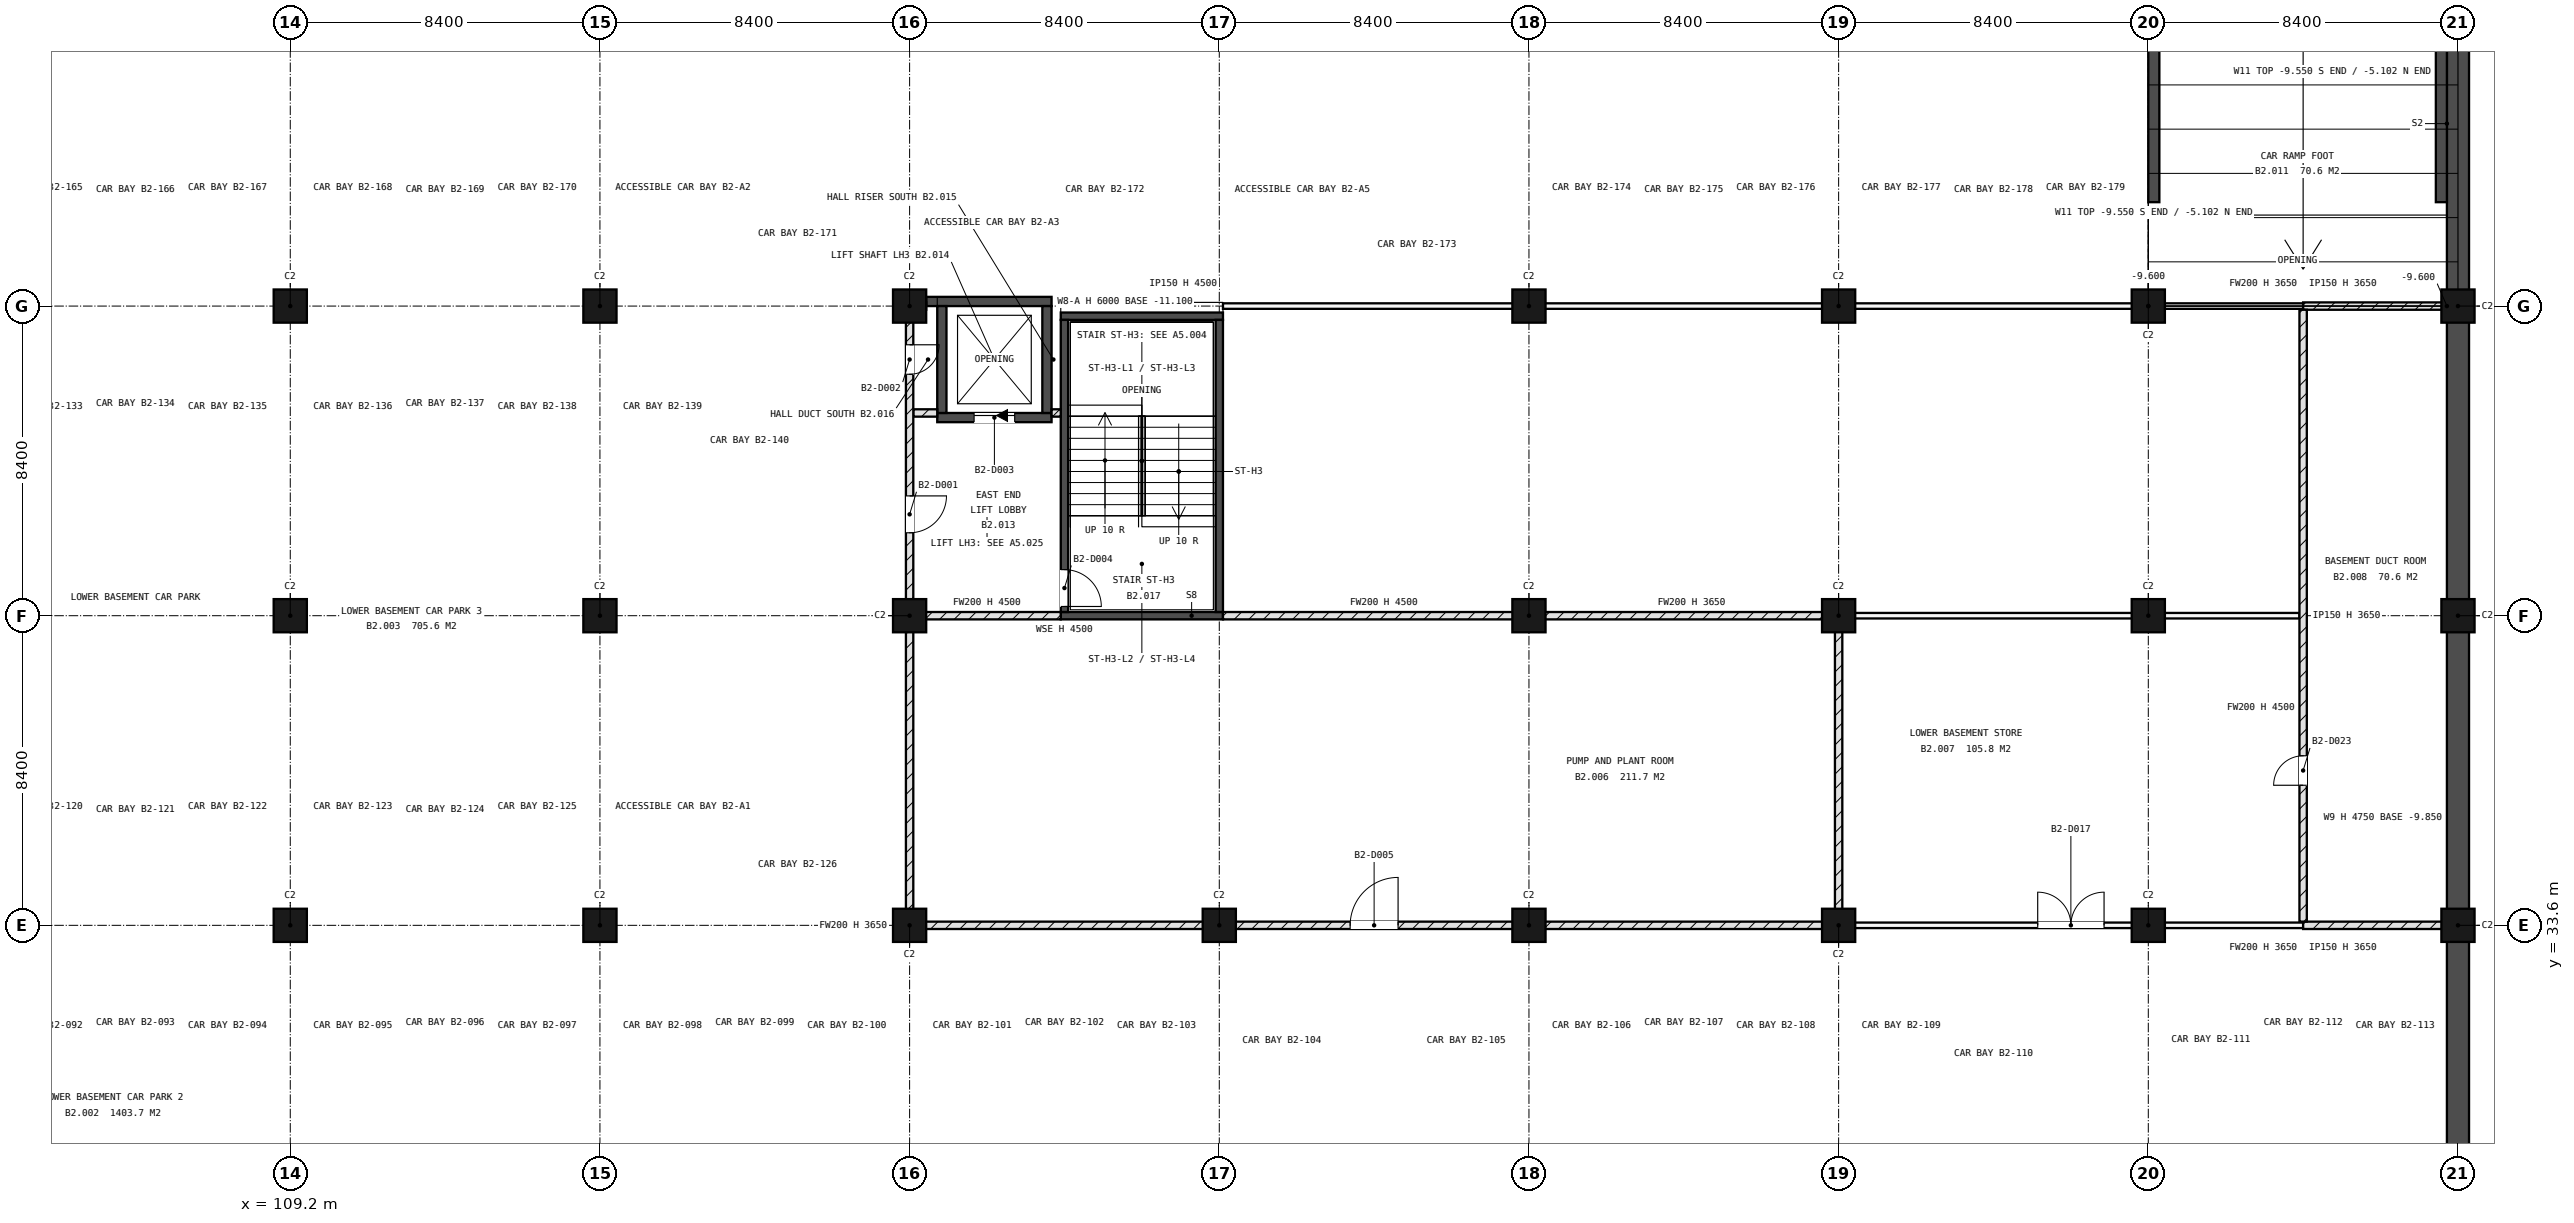
"""IFC4 building model, lengths in metres.
Left out: names, types, materials, properties, quantities, classifications, styles, units other than length and angle.
Written with IfcOpenShell. Run it as: python <this file> out.ifc"""

import sys

from ifc_helpers import new_model, si_unit, direction, frame, frame_2d, origin, origin_2d, place, context, subcontext, project, spatial, polyline, rectangle, outline, extrude, element, fill, save


model = new_model("IFC4")
c1 = context("Model", 3, precision=1e-05, world=origin(), true_north=direction((0.0, 1.0)))
c2 = subcontext(c1, "Body", "Model", "MODEL_VIEW")
j1 = project(units=[si_unit("LENGTHUNIT", "METRE"), si_unit("PLANEANGLEUNIT", "RADIAN")], contexts=[c1])
p1 = place(None, origin())
s1 = spatial("IfcSite", under=j1, at=p1, CompositionType="ELEMENT")
p2 = place(p1, origin())
s2 = spatial("IfcBuilding", under=s1, at=p2, CompositionType="ELEMENT")
p3 = place(p2, frame((0.0, 0.0, -9.6)))
s3 = spatial("IfcBuildingStorey", under=s2, at=p3, CompositionType="ELEMENT", Elevation=-9.6)
for number, where, z_axis, x_axis in (
    (1, (109.2, 33.6, -0.25), (0.0, 0.0, 1.0), (1.0, 0.0, 0.0)),
    (2, (109.2, 42.0, -0.25), (0.0, 0.0, 1.0), (1.0, 0.0, 0.0)),
    (3, (109.2, 50.4, -0.25), (0.0, 0.0, 1.0), (1.0, 0.0, 0.0)),
    (4, (117.6, 33.6, -0.25), (0.0, 0.0, 1.0), (1.0, 0.0, 0.0)),
    (5, (117.6, 42.0, -0.25), (0.0, 0.0, 1.0), (1.0, 0.0, 0.0)),
    (6, (117.6, 50.4, -0.25), (0.0, 0.0, 1.0), (1.0, 0.0, 0.0)),
    (7, (126.0, 33.6, -0.25), (0.0, 0.0, 1.0), (1.0, 0.0, 0.0)),
    (8, (126.0, 42.0, -0.25), (0.0, 0.0, 1.0), (1.0, 0.0, 0.0)),
    (9, (126.0, 50.4, -0.25), (0.0, 0.0, 1.0), (1.0, 0.0, 0.0)),
    (10, (134.4, 33.6, -0.25), (0.0, 0.0, 1.0), (1.0, 0.0, 0.0)),
    (11, (142.8, 33.6, -0.25), (0.0, 0.0, 1.0), (1.0, 0.0, 0.0)),
    (12, (142.8, 42.0, -0.25), (0.0, 0.0, 1.0), (1.0, 0.0, 0.0)),
    (13, (142.8, 50.4, -0.25), (0.0, 0.0, 1.0), (1.0, 0.0, 0.0)),
    (14, (151.2, 33.6, -0.25), (0.0, 0.0, 1.0), (1.0, 0.0, 0.0)),
    (15, (151.2, 42.0, -0.25), (0.0, 0.0, 1.0), (1.0, 0.0, 0.0)),
    (16, (151.2, 50.4, -0.25), (0.0, 0.0, 1.0), (1.0, 0.0, 0.0)),
    (17, (159.6, 33.6, -0.25), (0.0, 0.0, 1.0), (1.0, 0.0, 0.0)),
    (18, (159.6, 42.0, -0.25), (0.0, 0.0, 1.0), (1.0, 0.0, 0.0)),
    (19, (159.6, 50.4, -0.25), (0.0, 0.0, 1.0), (1.0, 0.0, 0.0)),
    (20, (168.0, 33.6, -0.25), (0.0, 0.0, 1.0), (1.0, 0.0, 0.0)),
    (21, (168.0, 42.0, -0.25), (0.0, 0.0, 1.0), (1.0, 0.0, 0.0)),
    (22, (168.0, 50.4, -0.25), (0.0, 0.0, 1.0), (1.0, 0.0, 0.0)),
):
    element("IfcColumn", number, at=place(p3, frame(where, z_axis=z_axis, x_axis=x_axis)), inside=s3, PredefinedType="COLUMN", context=c2, shape_type="SweptSolid", body=[
        extrude(rectangle(XDim=0.9, YDim=0.9, at=origin_2d()), origin(), (0.0, 0.0, 1.0), 4.75),
    ])
p4 = place(p3, frame((126.75, 47.375, -1.5), z_axis=(0.0, 0.0, 1.0), x_axis=(1.0, 0.0, 0.0)))
e23 = element("IfcWall", 23, at=p4, inside=s3, PredefinedType="SHEAR", context=c2, shape_type="SweptSolid", body=[
    extrude(rectangle(XDim=3.1, YDim=0.25, at=frame_2d((1.55, 0.0))), origin(), (0.0, 0.0, 1.0), 6.0),
])
p5 = place(p4, frame((1.0, 0.0, 1.5)))
e24 = element("IfcOpeningElement", 24, at=p5, cuts=e23, PredefinedType="OPENING", context=c2, shape_type="SweptSolid", body=[
    extrude(rectangle(XDim=1.1, YDim=2.1, at=frame_2d((0.55, 1.05))), frame((0.0, 0.135, 0.0), z_axis=(0.0, -1.0, 0.0), x_axis=(1.0, 0.0, 0.0)), (0.0, 0.0, 1.0), 0.27),
])
p6 = place(p3, frame((126.45, 50.525, -1.5), z_axis=(0.0, 0.0, 1.0), x_axis=(1.0, 0.0, 0.0)))
e25 = element("IfcWall", 25, at=p6, inside=s3, PredefinedType="SHEAR", context=c2, shape_type="SweptSolid", body=[
    extrude(rectangle(XDim=3.4, YDim=0.25, at=frame_2d((1.7, 0.0))), origin(), (0.0, 0.0, 1.0), 6.0),
])
for number, where, z_axis, x_axis in (
    (26, (126.875, 47.5, -1.5), (0.0, 0.0, 1.0), (0.0, 1.0, 0.0)),
    (27, (129.725, 47.5, -1.5), (0.0, 0.0, 1.0), (0.0, 1.0, 0.0)),
):
    element("IfcWall", number, at=place(p3, frame(where, z_axis=z_axis, x_axis=x_axis)), inside=s3, PredefinedType="SHEAR", context=c2, shape_type="SweptSolid", body=[
        extrude(rectangle(XDim=2.9, YDim=0.25, at=frame_2d((1.45, 0.0))), origin(), (0.0, 0.0, 1.0), 6.0),
    ])
p7 = place(p3, frame((168.0, -0.3, -0.25), z_axis=(0.0, 0.0, 1.0), x_axis=(0.0, 1.0, 0.0)))
e28 = element("IfcWall", 28, at=p7, inside=s3, PredefinedType="SOLIDWALL", context=c2, shape_type="SweptSolid", body=[
    extrude(rectangle(XDim=118.2, YDim=0.6, at=frame_2d((59.1, 0.0))), origin(), (0.0, 0.0, 1.0), 4.75),
])
for number, where, z_axis, x_axis in (
    (29, (159.75, 53.219, 0.0), (0.0, 0.0, 1.0), (0.0, 1.0, 0.0)),
    (30, (167.55, 53.219, 0.0), (0.0, 0.0, 1.0), (0.0, 1.0, 0.0)),
):
    element("IfcWall", number, at=place(p3, frame(where, z_axis=z_axis, x_axis=x_axis)), inside=s3, PredefinedType="SOLIDWALL", context=c2, shape_type="SweptSolid", body=[
        extrude(outline(polyline([(0.0, 0.0), (35.581, 0.0), (35.581, 4.498), (0.0, 0.05), (0.0, 0.0)])), frame((0.0, 0.15, 0.0), z_axis=(0.0, -1.0, 0.0), x_axis=(1.0, 0.0, 0.0)), (0.0, 0.0, 1.0), 0.3),
    ])
for number, where, z_axis, x_axis in (
    (31, (130.1, 42.0, 0.0), (0.0, 0.0, 1.0), (1.0, 0.0, 0.0)),
    (32, (130.1, 50.125, 0.0), (0.0, 0.0, 1.0), (1.0, 0.0, 0.0)),
):
    element("IfcWall", number, at=place(p3, frame(where, z_axis=z_axis, x_axis=x_axis)), inside=s3, PredefinedType="SHEAR", context=c2, shape_type="SweptSolid", body=[
        extrude(rectangle(XDim=4.4, YDim=0.2, at=frame_2d((2.2, 0.0))), origin(), (0.0, 0.0, 1.0), 4.5),
    ])
p8 = place(p3, frame((130.2, 42.1, 0.0), z_axis=(0.0, 0.0, 1.0), x_axis=(0.0, 1.0, 0.0)))
e33 = element("IfcWall", 33, at=p8, inside=s3, PredefinedType="SHEAR", context=c2, shape_type="SweptSolid", body=[
    extrude(rectangle(XDim=7.925, YDim=0.2, at=frame_2d((3.962, 0.0))), origin(), (0.0, 0.0, 1.0), 4.5),
])
p9 = place(p8, frame((0.15, 0.0, 0.0)))
e34 = element("IfcOpeningElement", 34, at=p9, cuts=e33, PredefinedType="OPENING", context=c2, shape_type="SweptSolid", body=[
    extrude(rectangle(XDim=1.0, YDim=2.1, at=frame_2d((0.5, 1.05))), frame((0.0, 0.11, 0.0), z_axis=(0.0, -1.0, 0.0), x_axis=(1.0, 0.0, 0.0)), (0.0, 0.0, 1.0), 0.22),
])
p10 = place(p3, frame((134.4, 42.1, 0.0), z_axis=(0.0, 0.0, 1.0), x_axis=(0.0, 1.0, 0.0)))
e35 = element("IfcWall", 35, at=p10, inside=s3, PredefinedType="SHEAR", context=c2, shape_type="SweptSolid", body=[
    extrude(rectangle(XDim=7.925, YDim=0.2, at=frame_2d((3.962, 0.0))), origin(), (0.0, 0.0, 1.0), 4.5),
])
p11 = place(p3, frame((125.9, 33.6, 0.0), z_axis=(0.0, 0.0, 1.0), x_axis=(1.0, 0.0, 0.0)))
e36 = element("IfcWall", 36, at=p11, inside=s3, PredefinedType="SOLIDWALL", context=c2, shape_type="SweptSolid", body=[
    extrude(rectangle(XDim=25.3, YDim=0.2, at=frame_2d((12.65, 0.0))), origin(), (0.0, 0.0, 1.0), 3.65),
])
p12 = place(p11, frame((12.05, 0.0, 0.0)))
e37 = element("IfcOpeningElement", 37, at=p12, cuts=e36, PredefinedType="OPENING", context=c2, shape_type="SweptSolid", body=[
    extrude(rectangle(XDim=1.3, YDim=2.1, at=frame_2d((0.65, 1.05))), frame((0.0, 0.11, 0.0), z_axis=(0.0, -1.0, 0.0), x_axis=(1.0, 0.0, 0.0)), (0.0, 0.0, 1.0), 0.22),
])
p13 = place(p3, frame((151.2, 33.6, 0.0), z_axis=(0.0, 0.0, 1.0), x_axis=(1.0, 0.0, 0.0)))
e38 = element("IfcWall", 38, at=p13, inside=s3, PredefinedType="PARTITIONING", context=c2, shape_type="SweptSolid", body=[
    extrude(rectangle(XDim=12.6, YDim=0.15, at=frame_2d((6.3, 0.0))), origin(), (0.0, 0.0, 1.0), 3.65),
])
p14 = place(p13, frame((5.4, 0.0, 0.0)))
e39 = element("IfcOpeningElement", 39, at=p14, cuts=e38, PredefinedType="OPENING", context=c2, shape_type="SweptSolid", body=[
    extrude(rectangle(XDim=1.8, YDim=2.1, at=frame_2d((0.9, 1.05))), frame((0.0, 0.085, 0.0), z_axis=(0.0, -1.0, 0.0), x_axis=(1.0, 0.0, 0.0)), (0.0, 0.0, 1.0), 0.17),
])
p15 = place(p3, frame((163.8, 33.6, 0.0), z_axis=(0.0, 0.0, 1.0), x_axis=(1.0, 0.0, 0.0)))
e40 = element("IfcWall", 40, at=p15, inside=s3, PredefinedType="SOLIDWALL", context=c2, shape_type="SweptSolid", body=[
    extrude(rectangle(XDim=3.9, YDim=0.2, at=frame_2d((1.95, 0.0))), origin(), (0.0, 0.0, 1.0), 3.65),
])
p16 = place(p3, frame((126.1, 42.0, 0.0), z_axis=(0.0, 0.0, 1.0), x_axis=(1.0, 0.0, 0.0)))
e41 = element("IfcWall", 41, at=p16, inside=s3, PredefinedType="SOLIDWALL", context=c2, shape_type="SweptSolid", body=[
    extrude(rectangle(XDim=4.0, YDim=0.2, at=frame_2d((2.0, 0.0))), origin(), (0.0, 0.0, 1.0), 4.5),
])
p17 = place(p3, frame((134.5, 42.0, 0.0), z_axis=(0.0, 0.0, 1.0), x_axis=(1.0, 0.0, 0.0)))
e42 = element("IfcWall", 42, at=p17, inside=s3, PredefinedType="SOLIDWALL", context=c2, shape_type="SweptSolid", body=[
    extrude(rectangle(XDim=8.73, YDim=0.2, at=frame_2d((4.365, 0.0))), origin(), (0.0, 0.0, 1.0), 4.5),
])
p18 = place(p3, frame((143.23, 42.0, 0.0), z_axis=(0.0, 0.0, 1.0), x_axis=(1.0, 0.0, 0.0)))
e43 = element("IfcWall", 43, at=p18, inside=s3, PredefinedType="SOLIDWALL", context=c2, shape_type="SweptSolid", body=[
    extrude(rectangle(XDim=7.97, YDim=0.2, at=frame_2d((3.985, 0.0))), origin(), (0.0, 0.0, 1.0), 3.65),
])
p19 = place(p3, frame((151.2, 42.0, 0.0), z_axis=(0.0, 0.0, 1.0), x_axis=(1.0, 0.0, 0.0)))
e44 = element("IfcWall", 44, at=p19, inside=s3, PredefinedType="PARTITIONING", context=c2, shape_type="SweptSolid", body=[
    extrude(rectangle(XDim=12.5, YDim=0.15, at=frame_2d((6.25, 0.0))), origin(), (0.0, 0.0, 1.0), 3.65),
])
p20 = place(p3, frame((126.1, 47.5, 0.0), z_axis=(0.0, 0.0, 1.0), x_axis=(1.0, 0.0, 0.0)))
e45 = element("IfcWall", 45, at=p20, inside=s3, PredefinedType="SOLIDWALL", context=c2, shape_type="SweptSolid", body=[
    extrude(rectangle(XDim=0.65, YDim=0.2, at=frame_2d((0.325, 0.0))), origin(), (0.0, 0.0, 1.0), 4.5),
])
p21 = place(p3, frame((129.85, 47.5, 0.0), z_axis=(0.0, 0.0, 1.0), x_axis=(1.0, 0.0, 0.0)))
e46 = element("IfcWall", 46, at=p21, inside=s3, PredefinedType="SOLIDWALL", context=c2, shape_type="SweptSolid", body=[
    extrude(rectangle(XDim=0.25, YDim=0.2, at=frame_2d((0.125, 0.0))), origin(), (0.0, 0.0, 1.0), 4.5),
])
p22 = place(p3, frame((125.9, 50.4, 0.0), z_axis=(0.0, 0.0, 1.0), x_axis=(1.0, 0.0, 0.0)))
e47 = element("IfcWall", 47, at=p22, inside=s3, PredefinedType="SOLIDWALL", context=c2, shape_type="SweptSolid", body=[
    extrude(rectangle(XDim=0.55, YDim=0.2, at=frame_2d((0.275, 0.0))), origin(), (0.0, 0.0, 1.0), 4.5),
])
p23 = place(p3, frame((134.5, 50.4, 0.0), z_axis=(0.0, 0.0, 1.0), x_axis=(1.0, 0.0, 0.0)))
e48 = element("IfcWall", 48, at=p23, inside=s3, PredefinedType="PARTITIONING", context=c2, shape_type="SweptSolid", body=[
    extrude(rectangle(XDim=8.73, YDim=0.15, at=frame_2d((4.365, 0.0))), origin(), (0.0, 0.0, 1.0), 4.5),
])
p24 = place(p3, frame((143.23, 50.4, 0.0), z_axis=(0.0, 0.0, 1.0), x_axis=(1.0, 0.0, 0.0)))
e49 = element("IfcWall", 49, at=p24, inside=s3, PredefinedType="PARTITIONING", context=c2, shape_type="SweptSolid", body=[
    extrude(rectangle(XDim=20.57, YDim=0.15, at=frame_2d((10.285, 0.0))), origin(), (0.0, 0.0, 1.0), 3.65),
])
p25 = place(p3, frame((163.8, 50.4, 0.0), z_axis=(0.0, 0.0, 1.0), x_axis=(1.0, 0.0, 0.0)))
e50 = element("IfcWall", 50, at=p25, inside=s3, PredefinedType="SOLIDWALL", context=c2, shape_type="SweptSolid", body=[
    extrude(rectangle(XDim=3.9, YDim=0.2, at=frame_2d((1.95, 0.0))), origin(), (0.0, 0.0, 1.0), 3.65),
])
p26 = place(p3, frame((126.0, 33.7, 0.0), z_axis=(0.0, 0.0, 1.0), x_axis=(0.0, 1.0, 0.0)))
e51 = element("IfcWall", 51, at=p26, inside=s3, PredefinedType="SOLIDWALL", context=c2, shape_type="SweptSolid", body=[
    extrude(rectangle(XDim=16.6, YDim=0.2, at=frame_2d((8.3, 0.0))), origin(), (0.0, 0.0, 1.0), 3.65),
])
p27 = place(p26, frame((14.85, 0.0, 0.0)))
e52 = element("IfcOpeningElement", 52, at=p27, cuts=e51, PredefinedType="OPENING", context=c2, shape_type="SweptSolid", body=[
    extrude(rectangle(XDim=0.8, YDim=2.1, at=frame_2d((0.4, 1.05))), frame((0.0, 0.11, 0.0), z_axis=(0.0, -1.0, 0.0), x_axis=(1.0, 0.0, 0.0)), (0.0, 0.0, 1.0), 0.22),
])
p28 = place(p26, frame((10.55, 0.0, 0.0)))
e53 = element("IfcOpeningElement", 53, at=p28, cuts=e51, PredefinedType="OPENING", context=c2, shape_type="SweptSolid", body=[
    extrude(rectangle(XDim=1.0, YDim=2.1, at=frame_2d((0.5, 1.05))), frame((0.0, 0.11, 0.0), z_axis=(0.0, -1.0, 0.0), x_axis=(1.0, 0.0, 0.0)), (0.0, 0.0, 1.0), 0.22),
])
p29 = place(p3, frame((151.2, 33.7, 0.0), z_axis=(0.0, 0.0, 1.0), x_axis=(0.0, 1.0, 0.0)))
e54 = element("IfcWall", 54, at=p29, inside=s3, PredefinedType="SOLIDWALL", context=c2, shape_type="SweptSolid", body=[
    extrude(rectangle(XDim=8.2, YDim=0.2, at=frame_2d((4.1, 0.0))), origin(), (0.0, 0.0, 1.0), 3.65),
])
p30 = place(p3, frame((163.8, 33.7, 0.0), z_axis=(0.0, 0.0, 1.0), x_axis=(0.0, 1.0, 0.0)))
e55 = element("IfcWall", 55, at=p30, inside=s3, PredefinedType="SOLIDWALL", context=c2, shape_type="SweptSolid", body=[
    extrude(rectangle(XDim=16.6, YDim=0.2, at=frame_2d((8.3, 0.0))), origin(), (0.0, 0.0, 1.0), 4.5),
])
p31 = place(p30, frame((3.7, 0.0, 0.0)))
e56 = element("IfcOpeningElement", 56, at=p31, cuts=e55, PredefinedType="OPENING", context=c2, shape_type="SweptSolid", body=[
    extrude(rectangle(XDim=0.8, YDim=2.1, at=frame_2d((0.4, 1.05))), frame((0.0, 0.11, 0.0), z_axis=(0.0, -1.0, 0.0), x_axis=(1.0, 0.0, 0.0)), (0.0, 0.0, 1.0), 0.22),
])
p32 = place(p5, origin())
e57 = element("IfcDoor", 57, at=p32, inside=s3, OperationType="SLIDING_TO_LEFT", PredefinedType="DOOR", context=c2, shape_type="SweptSolid", body=[
    extrude(rectangle(XDim=1.1, YDim=2.1, at=frame_2d((0.55, 1.05))), frame((0.0, 0.025, 0.0), z_axis=(0.0, -1.0, 0.0), x_axis=(1.0, 0.0, 0.0)), (0.0, 0.0, 1.0), 0.05),
])
fill(e24, e57)
p33 = place(p9, origin())
e58 = element("IfcDoor", 58, at=p33, inside=s3, OperationType="SINGLE_SWING_LEFT", PredefinedType="DOOR", context=c2, shape_type="SweptSolid", body=[
    extrude(rectangle(XDim=1.0, YDim=2.1, at=frame_2d((0.5, 1.05))), frame((0.0, 0.025, 0.0), z_axis=(0.0, -1.0, 0.0), x_axis=(1.0, 0.0, 0.0)), (0.0, 0.0, 1.0), 0.05),
])
fill(e34, e58)
p34 = place(p12, origin())
e59 = element("IfcDoor", 59, at=p34, inside=s3, OperationType="SINGLE_SWING_LEFT", PredefinedType="DOOR", context=c2, shape_type="SweptSolid", body=[
    extrude(rectangle(XDim=1.3, YDim=2.1, at=frame_2d((0.65, 1.05))), frame((0.0, 0.025, 0.0), z_axis=(0.0, -1.0, 0.0), x_axis=(1.0, 0.0, 0.0)), (0.0, 0.0, 1.0), 0.05),
])
fill(e37, e59)
p35 = place(p14, origin())
e60 = element("IfcDoor", 60, at=p35, inside=s3, OperationType="DOUBLE_DOOR_SINGLE_SWING", PredefinedType="DOOR", context=c2, shape_type="SweptSolid", body=[
    extrude(rectangle(XDim=1.8, YDim=2.1, at=frame_2d((0.9, 1.05))), frame((0.0, 0.025, 0.0), z_axis=(0.0, -1.0, 0.0), x_axis=(1.0, 0.0, 0.0)), (0.0, 0.0, 1.0), 0.05),
])
fill(e39, e60)
p36 = place(p31, origin())
e61 = element("IfcDoor", 61, at=p36, inside=s3, OperationType="SINGLE_SWING_RIGHT", PredefinedType="DOOR", context=c2, shape_type="SweptSolid", body=[
    extrude(rectangle(XDim=0.8, YDim=2.1, at=frame_2d((0.4, 1.05))), frame((0.0, 0.025, 0.0), z_axis=(0.0, -1.0, 0.0), x_axis=(1.0, 0.0, 0.0)), (0.0, 0.0, 1.0), 0.05),
])
fill(e56, e61)
p37 = place(p27, origin())
e62 = element("IfcDoor", 62, at=p37, inside=s3, OperationType="SINGLE_SWING_RIGHT", PredefinedType="DOOR", context=c2, shape_type="SweptSolid", body=[
    extrude(rectangle(XDim=0.8, YDim=2.1, at=frame_2d((0.4, 1.05))), frame((0.0, 0.025, 0.0), z_axis=(0.0, -1.0, 0.0), x_axis=(1.0, 0.0, 0.0)), (0.0, 0.0, 1.0), 0.05),
])
fill(e52, e62)
p38 = place(p28, origin())
e63 = element("IfcDoor", 63, at=p38, inside=s3, OperationType="SINGLE_SWING_RIGHT", PredefinedType="DOOR", context=c2, shape_type="SweptSolid", body=[
    extrude(rectangle(XDim=1.0, YDim=2.1, at=frame_2d((0.5, 1.05))), frame((0.0, 0.025, 0.0), z_axis=(0.0, -1.0, 0.0), x_axis=(1.0, 0.0, 0.0)), (0.0, 0.0, 1.0), 0.05),
])
fill(e53, e63)
save(model, sys.argv[1])
